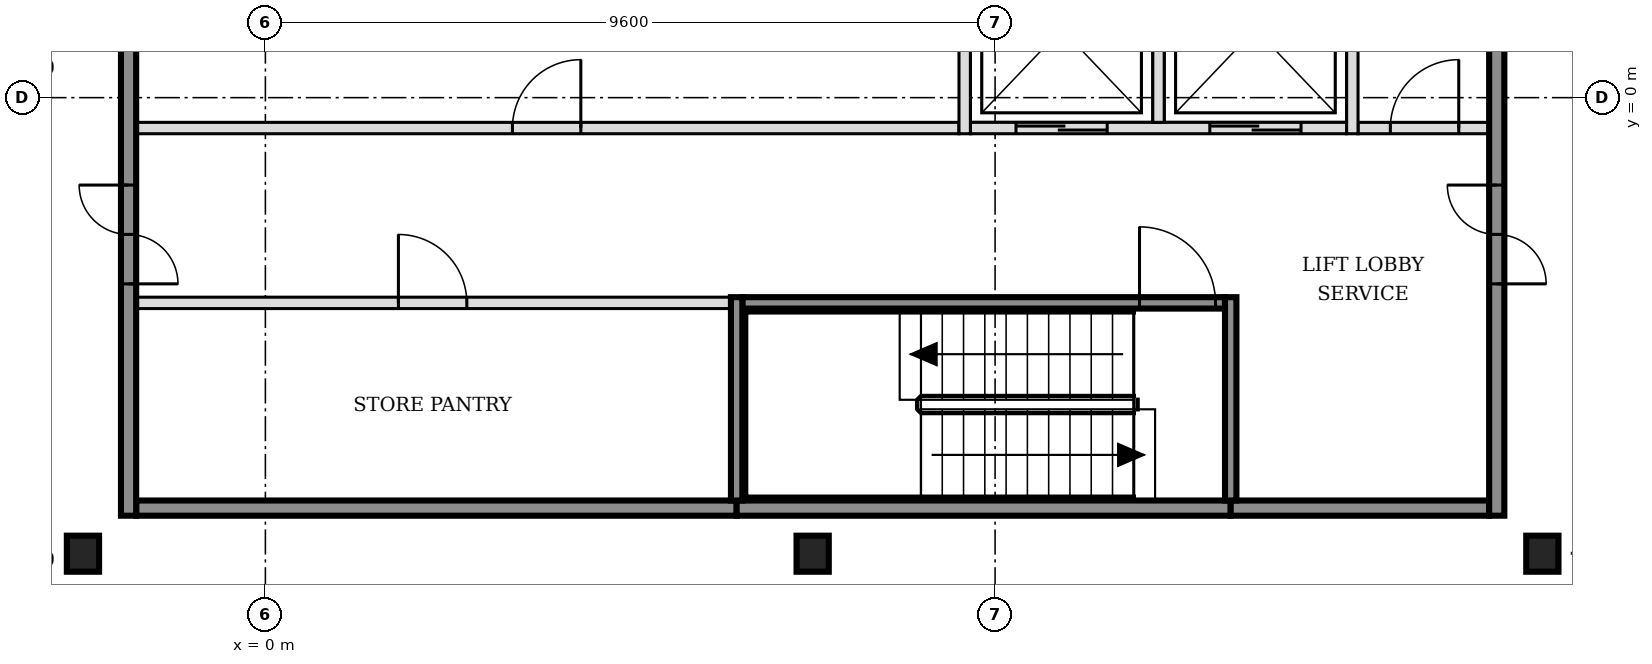
"""IFC4 building model, lengths in metres.
Left out: names, types, materials, properties, quantities, classifications, styles, units other than length and angle.
Written with IfcOpenShell. Run it as: python <this file> out.ifc"""

import sys

from ifc_helpers import new_model, si_unit, direction, frame, frame_2d, origin, origin_2d, place, context, subcontext, project, spatial, rectangle, i_section, extrude, element, fill, save


model = new_model("IFC4")
c1 = context("Model", 3, precision=1e-05, world=origin(), true_north=direction((0.0, 1.0)))
c2 = subcontext(c1, "Body", "Model", "MODEL_VIEW")
j1 = project(units=[si_unit("LENGTHUNIT", "METRE"), si_unit("PLANEANGLEUNIT", "RADIAN")], contexts=[c1])
p1 = place(None, origin())
s1 = spatial("IfcSite", under=j1, at=p1, CompositionType="ELEMENT")
p2 = place(p1, origin())
s2 = spatial("IfcBuilding", under=s1, at=p2, CompositionType="ELEMENT")
p3 = place(p2, frame((0.0, 0.0, 147.0)))
s3 = spatial("IfcBuildingStorey", under=s2, at=p3, CompositionType="ELEMENT", Elevation=147.0)
for number, where, z_axis, x_axis in (
    (1, (-2.4, -6.0, -0.15), (0.0, 0.0, 1.0), (1.0, 0.0, 0.0)),
    (2, (7.2, -6.0, -0.15), (0.0, 0.0, 1.0), (1.0, 0.0, 0.0)),
    (3, (16.8, -6.0, -0.15), (0.0, 0.0, 1.0), (1.0, 0.0, 0.0)),
):
    element("IfcColumn", number, at=place(p3, frame(where, z_axis=z_axis, x_axis=x_axis)), inside=s3, PredefinedType="COLUMN", context=c2, shape_type="SweptSolid", body=[
        extrude(i_section(OverallWidth=0.424, OverallDepth=0.474, WebThickness=0.048, FlangeThickness=0.077, FilletRadius=0.015, at=origin_2d()), origin(), (0.0, 0.0, 1.0), 3.6),
    ])
p4 = place(p3, frame((-1.7, -5.4, 0.0), z_axis=(0.0, 0.0, 1.0), x_axis=(1.0, 0.0, 0.0)))
e4 = element("IfcWall", 4, at=p4, inside=s3, PredefinedType="SOLIDWALL", context=c2, shape_type="SweptSolid", body=[
    extrude(rectangle(XDim=7.9, YDim=0.2, at=frame_2d((3.95, 0.0))), origin(), (0.0, 0.0, 1.0), 3.45),
])
p5 = place(p3, frame((6.2, -5.4, 0.0), z_axis=(0.0, 0.0, 1.0), x_axis=(1.0, 0.0, 0.0)))
e5 = element("IfcWall", 5, at=p5, inside=s3, PredefinedType="SOLIDWALL", context=c2, shape_type="SweptSolid", body=[
    extrude(rectangle(XDim=6.5, YDim=0.2, at=frame_2d((3.25, 0.0))), origin(), (0.0, 0.0, 1.0), 3.45),
])
p6 = place(p3, frame((12.7, -5.4, 0.0), z_axis=(0.0, 0.0, 1.0), x_axis=(1.0, 0.0, 0.0)))
e6 = element("IfcWall", 6, at=p6, inside=s3, PredefinedType="SOLIDWALL", context=c2, shape_type="SweptSolid", body=[
    extrude(rectangle(XDim=3.4, YDim=0.2, at=frame_2d((1.7, 0.0))), origin(), (0.0, 0.0, 1.0), 3.45),
])
p7 = place(p3, frame((-1.7, -2.7, 0.0), z_axis=(0.0, 0.0, 1.0), x_axis=(1.0, 0.0, 0.0)))
e7 = element("IfcWall", 7, at=p7, inside=s3, PredefinedType="PARTITIONING", context=c2, shape_type="SweptSolid", body=[
    extrude(rectangle(XDim=7.825, YDim=0.15, at=frame_2d((3.913, 0.0))), origin(), (0.0, 0.0, 1.0), 3.45),
])
p8 = place(p7, frame((3.45, 0.0, 0.0)))
e8 = element("IfcOpeningElement", 8, at=p8, cuts=e7, PredefinedType="OPENING", context=c2, shape_type="SweptSolid", body=[
    extrude(rectangle(XDim=0.9, YDim=2.1, at=frame_2d((0.45, 1.05))), frame((0.0, 0.085, 0.0), z_axis=(0.0, -1.0, 0.0), x_axis=(1.0, 0.0, 0.0)), (0.0, 0.0, 1.0), 0.17),
])
p9 = place(p3, frame((6.275, -2.7, 0.0), z_axis=(0.0, 0.0, 1.0), x_axis=(1.0, 0.0, 0.0)))
e9 = element("IfcWall", 9, at=p9, inside=s3, PredefinedType="SOLIDWALL", context=c2, shape_type="SweptSolid", body=[
    extrude(rectangle(XDim=6.35, YDim=0.15, at=frame_2d((3.175, 0.0))), origin(), (0.0, 0.0, 1.0), 3.45),
])
p10 = place(p9, frame((5.225, 0.0, 0.0)))
e10 = element("IfcOpeningElement", 10, at=p10, cuts=e9, PredefinedType="OPENING", context=c2, shape_type="SweptSolid", body=[
    extrude(rectangle(XDim=1.0, YDim=2.1, at=frame_2d((0.5, 1.05))), frame((0.0, 0.085, 0.0), z_axis=(0.0, -1.0, 0.0), x_axis=(1.0, 0.0, 0.0)), (0.0, 0.0, 1.0), 0.17),
])
p11 = place(p3, frame((-1.7, -0.4, 0.0), z_axis=(0.0, 0.0, 1.0), x_axis=(1.0, 0.0, 0.0)))
e11 = element("IfcWall", 11, at=p11, inside=s3, PredefinedType="PARTITIONING", context=c2, shape_type="SweptSolid", body=[
    extrude(rectangle(XDim=10.825, YDim=0.15, at=frame_2d((5.413, 0.0))), origin(), (0.0, 0.0, 1.0), 3.45),
])
p12 = place(p11, frame((4.95, 0.0, 0.0)))
e12 = element("IfcOpeningElement", 12, at=p12, cuts=e11, PredefinedType="OPENING", context=c2, shape_type="SweptSolid", body=[
    extrude(rectangle(XDim=0.9, YDim=2.1, at=frame_2d((0.45, 1.05))), frame((0.0, 0.085, 0.0), z_axis=(0.0, -1.0, 0.0), x_axis=(1.0, 0.0, 0.0)), (0.0, 0.0, 1.0), 0.17),
])
p13 = place(p3, frame((9.275, -0.4, 0.0), z_axis=(0.0, 0.0, 1.0), x_axis=(1.0, 0.0, 0.0)))
e13 = element("IfcWall", 13, at=p13, inside=s3, PredefinedType="SOLIDWALL", context=c2, shape_type="SweptSolid", body=[
    extrude(rectangle(XDim=4.95, YDim=0.15, at=frame_2d((2.475, 0.0))), origin(), (0.0, 0.0, 1.0), 3.45),
])
p14 = place(p13, frame((0.6, 0.0, 0.0)))
e14 = element("IfcOpeningElement", 14, at=p14, cuts=e13, PredefinedType="OPENING", context=c2, shape_type="SweptSolid", body=[
    extrude(rectangle(XDim=1.2, YDim=2.1, at=frame_2d((0.6, 1.05))), frame((0.0, 0.085, 0.0), z_axis=(0.0, -1.0, 0.0), x_axis=(1.0, 0.0, 0.0)), (0.0, 0.0, 1.0), 0.17),
])
p15 = place(p13, frame((3.15, 0.0, 0.0)))
e15 = element("IfcOpeningElement", 15, at=p15, cuts=e13, PredefinedType="OPENING", context=c2, shape_type="SweptSolid", body=[
    extrude(rectangle(XDim=1.2, YDim=2.1, at=frame_2d((0.6, 1.05))), frame((0.0, 0.085, 0.0), z_axis=(0.0, -1.0, 0.0), x_axis=(1.0, 0.0, 0.0)), (0.0, 0.0, 1.0), 0.17),
])
p16 = place(p3, frame((14.375, -0.4, 0.0), z_axis=(0.0, 0.0, 1.0), x_axis=(1.0, 0.0, 0.0)))
e16 = element("IfcWall", 16, at=p16, inside=s3, PredefinedType="PARTITIONING", context=c2, shape_type="SweptSolid", body=[
    extrude(rectangle(XDim=1.725, YDim=0.15, at=frame_2d((0.863, 0.0))), origin(), (0.0, 0.0, 1.0), 3.45),
])
p17 = place(p16, frame((0.425, 0.0, 0.0)))
e17 = element("IfcOpeningElement", 17, at=p17, cuts=e16, PredefinedType="OPENING", context=c2, shape_type="SweptSolid", body=[
    extrude(rectangle(XDim=0.9, YDim=2.1, at=frame_2d((0.45, 1.05))), frame((0.0, 0.085, 0.0), z_axis=(0.0, -1.0, 0.0), x_axis=(1.0, 0.0, 0.0)), (0.0, 0.0, 1.0), 0.17),
])
p18 = place(p3, frame((-1.8, -5.5, 0.0), z_axis=(0.0, 0.0, 1.0), x_axis=(0.0, 1.0, 0.0)))
e18 = element("IfcWall", 18, at=p18, inside=s3, PredefinedType="SOLIDWALL", context=c2, shape_type="SweptSolid", body=[
    extrude(rectangle(XDim=15.8, YDim=0.2, at=frame_2d((7.9, 0.0))), origin(), (0.0, 0.0, 1.0), 3.45),
])
p19 = place(p18, frame((3.05, 0.0, 0.0)))
e19 = element("IfcOpeningElement", 19, at=p19, cuts=e18, PredefinedType="OPENING", context=c2, shape_type="SweptSolid", body=[
    extrude(rectangle(XDim=1.3, YDim=2.1, at=frame_2d((0.65, 1.05))), frame((0.0, 0.11, 0.0), z_axis=(0.0, -1.0, 0.0), x_axis=(1.0, 0.0, 0.0)), (0.0, 0.0, 1.0), 0.22),
])
p20 = place(p18, frame((11.45, 0.0, 0.0)))
e20 = element("IfcOpeningElement", 20, at=p20, cuts=e18, PredefinedType="OPENING", context=c2, shape_type="SweptSolid", body=[
    extrude(rectangle(XDim=1.3, YDim=2.1, at=frame_2d((0.65, 1.05))), frame((0.0, 0.11, 0.0), z_axis=(0.0, -1.0, 0.0), x_axis=(1.0, 0.0, 0.0)), (0.0, 0.0, 1.0), 0.22),
])
p21 = place(p3, frame((6.2, -5.3, 0.0), z_axis=(0.0, 0.0, 1.0), x_axis=(0.0, 1.0, 0.0)))
e21 = element("IfcWall", 21, at=p21, inside=s3, PredefinedType="SOLIDWALL", context=c2, shape_type="SweptSolid", body=[
    extrude(rectangle(XDim=2.675, YDim=0.15, at=frame_2d((1.337, 0.0))), origin(), (0.0, 0.0, 1.0), 3.45),
])
p22 = place(p3, frame((9.2, -0.475, 0.0), z_axis=(0.0, 0.0, 1.0), x_axis=(0.0, 1.0, 0.0)))
e22 = element("IfcWall", 22, at=p22, inside=s3, PredefinedType="SOLIDWALL", context=c2, shape_type="SweptSolid", body=[
    extrude(rectangle(XDim=2.6, YDim=0.15, at=frame_2d((1.3, 0.0))), origin(), (0.0, 0.0, 1.0), 3.45),
])
p23 = place(p3, frame((11.75, -0.325, 0.0), z_axis=(0.0, 0.0, 1.0), x_axis=(0.0, 1.0, 0.0)))
e23 = element("IfcWall", 23, at=p23, inside=s3, PredefinedType="SOLIDWALL", context=c2, shape_type="SweptSolid", body=[
    extrude(rectangle(XDim=2.45, YDim=0.15, at=frame_2d((1.225, 0.0))), origin(), (0.0, 0.0, 1.0), 3.45),
])
p24 = place(p3, frame((12.7, -5.3, 0.0), z_axis=(0.0, 0.0, 1.0), x_axis=(0.0, 1.0, 0.0)))
e24 = element("IfcWall", 24, at=p24, inside=s3, PredefinedType="SOLIDWALL", context=c2, shape_type="SweptSolid", body=[
    extrude(rectangle(XDim=2.675, YDim=0.15, at=frame_2d((1.337, 0.0))), origin(), (0.0, 0.0, 1.0), 3.45),
])
p25 = place(p3, frame((14.3, -0.475, 0.0), z_axis=(0.0, 0.0, 1.0), x_axis=(0.0, 1.0, 0.0)))
e25 = element("IfcWall", 25, at=p25, inside=s3, PredefinedType="SOLIDWALL", context=c2, shape_type="SweptSolid", body=[
    extrude(rectangle(XDim=2.75, YDim=0.15, at=frame_2d((1.375, 0.0))), origin(), (0.0, 0.0, 1.0), 3.45),
])
p26 = place(p3, frame((16.2, -5.5, 0.0), z_axis=(0.0, 0.0, 1.0), x_axis=(0.0, 1.0, 0.0)))
e26 = element("IfcWall", 26, at=p26, inside=s3, PredefinedType="SOLIDWALL", context=c2, shape_type="SweptSolid", body=[
    extrude(rectangle(XDim=15.8, YDim=0.2, at=frame_2d((7.9, 0.0))), origin(), (0.0, 0.0, 1.0), 3.45),
])
p27 = place(p26, frame((3.05, 0.0, 0.0)))
e27 = element("IfcOpeningElement", 27, at=p27, cuts=e26, PredefinedType="OPENING", context=c2, shape_type="SweptSolid", body=[
    extrude(rectangle(XDim=1.3, YDim=2.1, at=frame_2d((0.65, 1.05))), frame((0.0, 0.11, 0.0), z_axis=(0.0, -1.0, 0.0), x_axis=(1.0, 0.0, 0.0)), (0.0, 0.0, 1.0), 0.22),
])
p28 = place(p26, frame((11.45, 0.0, 0.0)))
e28 = element("IfcOpeningElement", 28, at=p28, cuts=e26, PredefinedType="OPENING", context=c2, shape_type="SweptSolid", body=[
    extrude(rectangle(XDim=1.3, YDim=2.1, at=frame_2d((0.65, 1.05))), frame((0.0, 0.11, 0.0), z_axis=(0.0, -1.0, 0.0), x_axis=(1.0, 0.0, 0.0)), (0.0, 0.0, 1.0), 0.22),
])
p29 = place(p14, origin())
e29 = element("IfcDoor", 29, at=p29, inside=s3, OperationType="DOUBLE_DOOR_SLIDING", PredefinedType="DOOR", context=c2, shape_type="SweptSolid", body=[
    extrude(rectangle(XDim=1.2, YDim=2.1, at=frame_2d((0.6, 1.05))), frame((0.0, 0.025, 0.0), z_axis=(0.0, -1.0, 0.0), x_axis=(1.0, 0.0, 0.0)), (0.0, 0.0, 1.0), 0.05),
])
fill(e14, e29)
p30 = place(p15, origin())
e30 = element("IfcDoor", 30, at=p30, inside=s3, OperationType="DOUBLE_DOOR_SLIDING", PredefinedType="DOOR", context=c2, shape_type="SweptSolid", body=[
    extrude(rectangle(XDim=1.2, YDim=2.1, at=frame_2d((0.6, 1.05))), frame((0.0, 0.025, 0.0), z_axis=(0.0, -1.0, 0.0), x_axis=(1.0, 0.0, 0.0)), (0.0, 0.0, 1.0), 0.05),
])
fill(e15, e30)
p31 = place(p10, origin())
e31 = element("IfcDoor", 31, at=p31, inside=s3, OperationType="SINGLE_SWING_LEFT", PredefinedType="DOOR", context=c2, shape_type="SweptSolid", body=[
    extrude(rectangle(XDim=1.0, YDim=2.1, at=frame_2d((0.5, 1.05))), frame((0.0, 0.025, 0.0), z_axis=(0.0, -1.0, 0.0), x_axis=(1.0, 0.0, 0.0)), (0.0, 0.0, 1.0), 0.05),
])
fill(e10, e31)
p32 = place(p19, origin())
e32 = element("IfcDoor", 32, at=p32, inside=s3, OperationType="DOUBLE_DOOR_SINGLE_SWING", PredefinedType="DOOR", context=c2, shape_type="SweptSolid", body=[
    extrude(rectangle(XDim=1.3, YDim=2.1, at=frame_2d((0.65, 1.05))), frame((0.0, 0.025, 0.0), z_axis=(0.0, -1.0, 0.0), x_axis=(1.0, 0.0, 0.0)), (0.0, 0.0, 1.0), 0.05),
])
fill(e19, e32)
p33 = place(p27, origin())
e33 = element("IfcDoor", 33, at=p33, inside=s3, OperationType="DOUBLE_DOOR_SINGLE_SWING", PredefinedType="DOOR", context=c2, shape_type="SweptSolid", body=[
    extrude(rectangle(XDim=1.3, YDim=2.1, at=frame_2d((0.65, 1.05))), frame((0.0, 0.025, 0.0), z_axis=(0.0, -1.0, 0.0), x_axis=(1.0, 0.0, 0.0)), (0.0, 0.0, 1.0), 0.05),
])
fill(e27, e33)
p34 = place(p17, origin())
e34 = element("IfcDoor", 34, at=p34, inside=s3, OperationType="SINGLE_SWING_RIGHT", PredefinedType="DOOR", context=c2, shape_type="SweptSolid", body=[
    extrude(rectangle(XDim=0.9, YDim=2.1, at=frame_2d((0.45, 1.05))), frame((0.0, 0.025, 0.0), z_axis=(0.0, -1.0, 0.0), x_axis=(1.0, 0.0, 0.0)), (0.0, 0.0, 1.0), 0.05),
])
fill(e17, e34)
p35 = place(p8, origin())
e35 = element("IfcDoor", 35, at=p35, inside=s3, OperationType="SINGLE_SWING_LEFT", PredefinedType="DOOR", context=c2, shape_type="SweptSolid", body=[
    extrude(rectangle(XDim=0.9, YDim=2.1, at=frame_2d((0.45, 1.05))), frame((0.0, 0.025, 0.0), z_axis=(0.0, -1.0, 0.0), x_axis=(1.0, 0.0, 0.0)), (0.0, 0.0, 1.0), 0.05),
])
fill(e8, e35)
p36 = place(p12, origin())
e36 = element("IfcDoor", 36, at=p36, inside=s3, OperationType="SINGLE_SWING_RIGHT", PredefinedType="DOOR", context=c2, shape_type="SweptSolid", body=[
    extrude(rectangle(XDim=0.9, YDim=2.1, at=frame_2d((0.45, 1.05))), frame((0.0, 0.025, 0.0), z_axis=(0.0, -1.0, 0.0), x_axis=(1.0, 0.0, 0.0)), (0.0, 0.0, 1.0), 0.05),
])
fill(e12, e36)
save(model, sys.argv[1])
